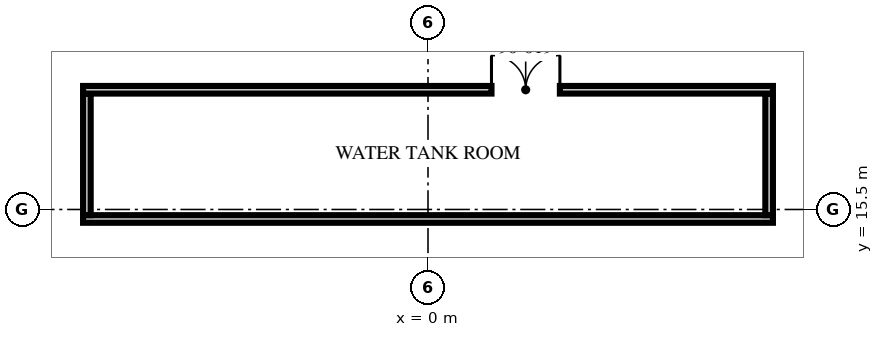
"""IFC4 building model, lengths in metres.
Left out: names, types, materials, properties, quantities, classifications, styles, units other than length and angle.
Written with IfcOpenShell. Run it as: python <this file> out.ifc"""

import sys

from ifc_helpers import new_model, si_unit, direction, frame, frame_2d, origin, place, context, subcontext, project, spatial, rectangle, extrude, element, fill, save


model = new_model("IFC4")
c1 = context("Model", 3, precision=1e-05, world=origin(), true_north=direction((0.0, 1.0)))
c2 = subcontext(c1, "Body", "Model", "MODEL_VIEW")
j1 = project(units=[si_unit("LENGTHUNIT", "METRE"), si_unit("PLANEANGLEUNIT", "RADIAN")], contexts=[c1])
p1 = place(None, origin())
s1 = spatial("IfcSite", under=j1, at=p1, CompositionType="ELEMENT")
p2 = place(p1, origin())
s2 = spatial("IfcBuilding", under=s1, at=p2, CompositionType="ELEMENT")
p3 = place(p2, frame((0.0, 0.0, 358.25)))
s3 = spatial("IfcBuildingStorey", under=s2, at=p3, CompositionType="ELEMENT", Elevation=358.25)
p4 = place(p3, frame((-9.076, 15.25, 0.0), z_axis=(0.0, 0.0, 1.0), x_axis=(1.0, 0.0, 0.0)))
e1 = element("IfcWall", 1, at=p4, inside=s3, PredefinedType="SOLIDWALL", context=c2, shape_type="SweptSolid", body=[
    extrude(rectangle(XDim=18.152, YDim=0.2, at=frame_2d((9.076, 0.0))), origin(), (0.0, 0.0, 1.0), 4.0),
])
for number, where, z_axis, x_axis in (
    (2, (-8.976, 15.35, 0.0), (0.0, 0.0, 1.0), (0.0, 1.0, 0.0)),
    (3, (8.976, 15.35, 0.0), (0.0, 0.0, 1.0), (0.0, 1.0, 0.0)),
):
    element("IfcWall", number, at=place(p3, frame(where, z_axis=z_axis, x_axis=x_axis)), inside=s3, PredefinedType="SOLIDWALL", context=c2, shape_type="SweptSolid", body=[
        extrude(rectangle(XDim=3.2, YDim=0.2, at=frame_2d((1.6, 0.0))), origin(), (0.0, 0.0, 1.0), 4.65),
    ])
p5 = place(p3, frame((-9.076, 18.65, 0.0), z_axis=(0.0, 0.0, 1.0), x_axis=(1.0, 0.0, 0.0)))
e4 = element("IfcWall", 4, at=p5, inside=s3, PredefinedType="SOLIDWALL", context=c2, shape_type="SweptSolid", body=[
    extrude(rectangle(XDim=18.152, YDim=0.2, at=frame_2d((9.076, 0.0))), origin(), (0.0, 0.0, 1.0), 4.0),
])
p6 = place(p5, frame((10.746, 0.0, 0.0)))
e5 = element("IfcOpeningElement", 5, at=p6, cuts=e4, PredefinedType="OPENING", context=c2, shape_type="SweptSolid", body=[
    extrude(rectangle(XDim=1.8, YDim=2.4, at=frame_2d((0.9, 1.2))), frame((0.0, 0.11, 0.0), z_axis=(0.0, -1.0, 0.0), x_axis=(1.0, 0.0, 0.0)), (0.0, 0.0, 1.0), 0.22),
])
p7 = place(p6, origin())
e6 = element("IfcDoor", 6, at=p7, inside=s3, OperationType="DOUBLE_DOOR_SINGLE_SWING", PredefinedType="DOOR", context=c2, shape_type="SweptSolid", body=[
    extrude(rectangle(XDim=1.8, YDim=2.4, at=frame_2d((0.9, 1.2))), frame((0.0, 0.025, 0.0), z_axis=(0.0, -1.0, 0.0), x_axis=(1.0, 0.0, 0.0)), (0.0, 0.0, 1.0), 0.05),
])
fill(e5, e6)
save(model, sys.argv[1])
